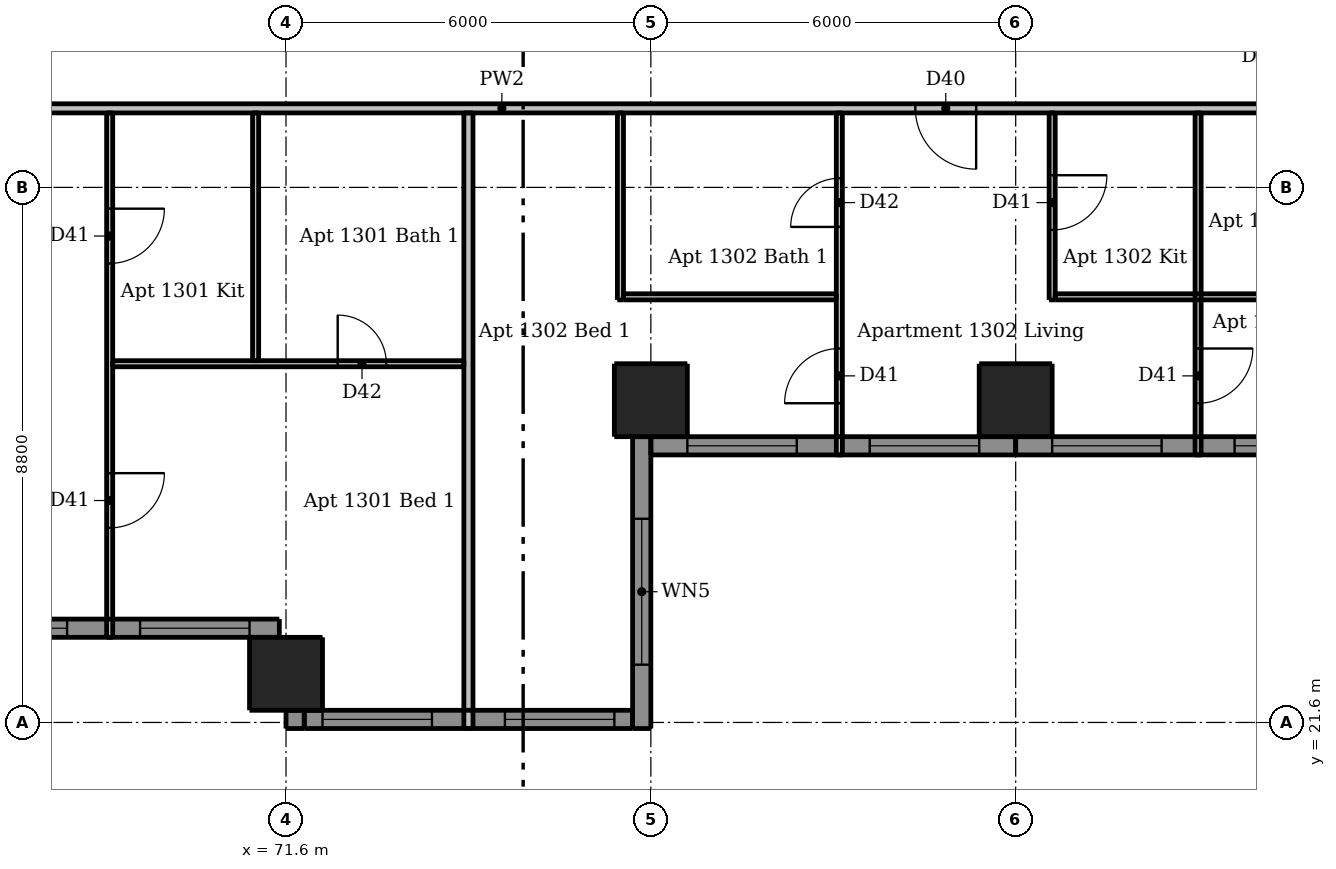
"""IFC4 building model, lengths in metres.
Left out: names, types, materials, properties, quantities, classifications, styles, units other than length and angle.
Written with IfcOpenShell. Run it as: python <this file> out.ifc"""

import sys

from ifc_helpers import new_model, si_unit, direction, frame, frame_2d, origin, origin_2d, place, context, subcontext, project, spatial, rectangle, extrude, element, fill, save


model = new_model("IFC4")
c1 = context("Model", 3, precision=1e-05, world=origin(), true_north=direction((0.0, 1.0)))
c2 = subcontext(c1, "Body", "Model", "MODEL_VIEW")
j1 = project(units=[si_unit("LENGTHUNIT", "METRE"), si_unit("PLANEANGLEUNIT", "RADIAN")], contexts=[c1])
p1 = place(None, origin())
s1 = spatial("IfcSite", under=j1, at=p1, CompositionType="ELEMENT")
p2 = place(p1, origin())
s2 = spatial("IfcBuilding", under=s1, at=p2, CompositionType="ELEMENT")
p3 = place(p2, frame((0.0, 0.0, 49.9)))
s3 = spatial("IfcBuildingStorey", under=s2, at=p3, CompositionType="ELEMENT", Elevation=49.9)
p4 = place(p3, frame((71.6, 22.4, 0.0), z_axis=(0.0, 0.0, 1.0), x_axis=(1.0, 0.0, 0.0)))
e1 = element("IfcColumn", 1, at=p4, inside=s3, PredefinedType="COLUMN", context=c2, shape_type="SweptSolid", body=[
    extrude(rectangle(XDim=1.2, YDim=1.2, at=origin_2d()), origin(), (0.0, 0.0, 1.0), 3.3),
])
for number, where, z_axis, x_axis in (
    (2, (77.6, 26.9, 0.0), (0.0, 0.0, 1.0), (1.0, 0.0, 0.0)),
    (3, (83.6, 26.9, 0.0), (0.0, 0.0, 1.0), (1.0, 0.0, 0.0)),
):
    element("IfcColumn", number, at=place(p3, frame(where, z_axis=z_axis, x_axis=x_axis)), inside=s3, PredefinedType="COLUMN", context=c2, shape_type="SweptSolid", body=[
        extrude(rectangle(XDim=1.2, YDim=1.2, at=origin_2d()), origin(), (0.0, 0.0, 1.0), 3.05),
    ])
p5 = place(p3, frame((71.75, 21.8, 0.0), z_axis=(0.0, 0.0, 1.0), x_axis=(0.0, -1.0, 0.0)))
e4 = element("IfcWall", 4, at=p5, inside=s3, PredefinedType="SOLIDWALL", context=c2, shape_type="SweptSolid", body=[
    extrude(rectangle(XDim=0.3, YDim=0.3, at=frame_2d((0.15, 0.0))), origin(), (0.0, 0.0, 1.0), 3.05),
])
p6 = place(p3, frame((77.45, 21.5, 0.0), z_axis=(0.0, 0.0, 1.0), x_axis=(0.0, 1.0, 0.0)))
e5 = element("IfcWall", 5, at=p6, inside=s3, PredefinedType="SOLIDWALL", context=c2, shape_type="SweptSolid", body=[
    extrude(rectangle(XDim=4.8, YDim=0.3, at=frame_2d((2.4, 0.0))), origin(), (0.0, 0.0, 1.0), 3.05),
])
p7 = place(p6, frame((1.05, 0.0, 0.15)))
e6 = element("IfcOpeningElement", 6, at=p7, cuts=e5, PredefinedType="OPENING", context=c2, shape_type="SweptSolid", body=[
    extrude(rectangle(XDim=2.4, YDim=2.1, at=frame_2d((1.2, 1.05))), frame((0.0, 0.16, 0.0), z_axis=(0.0, -1.0, 0.0), x_axis=(1.0, 0.0, 0.0)), (0.0, 0.0, 1.0), 0.32),
])
p8 = place(p3, frame((65.71, 23.15, 0.0), z_axis=(0.0, 0.0, 1.0), x_axis=(1.0, 0.0, 0.0)))
e7 = element("IfcWall", 7, at=p8, inside=s3, PredefinedType="SOLIDWALL", context=c2, shape_type="SweptSolid", body=[
    extrude(rectangle(XDim=5.78, YDim=0.3, at=frame_2d((2.89, 0.0))), origin(), (0.0, 0.0, 1.0), 3.05),
])
p9 = place(p8, frame((0.49, 0.0, 0.15)))
e8 = element("IfcOpeningElement", 8, at=p9, cuts=e7, PredefinedType="OPENING", context=c2, shape_type="SweptSolid", body=[
    extrude(rectangle(XDim=1.8, YDim=2.1, at=frame_2d((0.9, 1.05))), frame((0.0, 0.16, 0.0), z_axis=(0.0, -1.0, 0.0), x_axis=(1.0, 0.0, 0.0)), (0.0, 0.0, 1.0), 0.32),
])
p10 = place(p8, frame((3.49, 0.0, 0.15)))
e9 = element("IfcOpeningElement", 9, at=p10, cuts=e7, PredefinedType="OPENING", context=c2, shape_type="SweptSolid", body=[
    extrude(rectangle(XDim=1.8, YDim=2.1, at=frame_2d((0.9, 1.05))), frame((0.0, 0.16, 0.0), z_axis=(0.0, -1.0, 0.0), x_axis=(1.0, 0.0, 0.0)), (0.0, 0.0, 1.0), 0.32),
])
p11 = place(p3, frame((71.9, 21.65, 0.0), z_axis=(0.0, 0.0, 1.0), x_axis=(1.0, 0.0, 0.0)))
e10 = element("IfcWall", 10, at=p11, inside=s3, PredefinedType="SOLIDWALL", context=c2, shape_type="SweptSolid", body=[
    extrude(rectangle(XDim=5.4, YDim=0.3, at=frame_2d((2.7, 0.0))), origin(), (0.0, 0.0, 1.0), 3.05),
])
p12 = place(p11, frame((0.3, 0.0, 0.15)))
e11 = element("IfcOpeningElement", 11, at=p12, cuts=e10, PredefinedType="OPENING", context=c2, shape_type="SweptSolid", body=[
    extrude(rectangle(XDim=1.8, YDim=2.1, at=frame_2d((0.9, 1.05))), frame((0.0, 0.16, 0.0), z_axis=(0.0, -1.0, 0.0), x_axis=(1.0, 0.0, 0.0)), (0.0, 0.0, 1.0), 0.32),
])
p13 = place(p11, frame((3.3, 0.0, 0.15)))
e12 = element("IfcOpeningElement", 12, at=p13, cuts=e10, PredefinedType="OPENING", context=c2, shape_type="SweptSolid", body=[
    extrude(rectangle(XDim=1.8, YDim=2.1, at=frame_2d((0.9, 1.05))), frame((0.0, 0.16, 0.0), z_axis=(0.0, -1.0, 0.0), x_axis=(1.0, 0.0, 0.0)), (0.0, 0.0, 1.0), 0.32),
])
p14 = place(p3, frame((77.6, 26.15, 0.0), z_axis=(0.0, 0.0, 1.0), x_axis=(1.0, 0.0, 0.0)))
e13 = element("IfcWall", 13, at=p14, inside=s3, PredefinedType="SOLIDWALL", context=c2, shape_type="SweptSolid", body=[
    extrude(rectangle(XDim=6.0, YDim=0.3, at=frame_2d((3.0, 0.0))), origin(), (0.0, 0.0, 1.0), 3.05),
])
p15 = place(p14, frame((0.6, 0.0, 0.15)))
e14 = element("IfcOpeningElement", 14, at=p15, cuts=e13, PredefinedType="OPENING", context=c2, shape_type="SweptSolid", body=[
    extrude(rectangle(XDim=1.8, YDim=2.1, at=frame_2d((0.9, 1.05))), frame((0.0, 0.16, 0.0), z_axis=(0.0, -1.0, 0.0), x_axis=(1.0, 0.0, 0.0)), (0.0, 0.0, 1.0), 0.32),
])
p16 = place(p14, frame((3.6, 0.0, 0.15)))
e15 = element("IfcOpeningElement", 15, at=p16, cuts=e13, PredefinedType="OPENING", context=c2, shape_type="SweptSolid", body=[
    extrude(rectangle(XDim=1.8, YDim=2.1, at=frame_2d((0.9, 1.05))), frame((0.0, 0.16, 0.0), z_axis=(0.0, -1.0, 0.0), x_axis=(1.0, 0.0, 0.0)), (0.0, 0.0, 1.0), 0.32),
])
p17 = place(p3, frame((83.6, 26.15, 0.0), z_axis=(0.0, 0.0, 1.0), x_axis=(1.0, 0.0, 0.0)))
e16 = element("IfcWall", 16, at=p17, inside=s3, PredefinedType="SOLIDWALL", context=c2, shape_type="SweptSolid", body=[
    extrude(rectangle(XDim=5.89, YDim=0.3, at=frame_2d((2.945, 0.0))), origin(), (0.0, 0.0, 1.0), 3.05),
])
p18 = place(p17, frame((0.6, 0.0, 0.15)))
e17 = element("IfcOpeningElement", 17, at=p18, cuts=e16, PredefinedType="OPENING", context=c2, shape_type="SweptSolid", body=[
    extrude(rectangle(XDim=1.8, YDim=2.1, at=frame_2d((0.9, 1.05))), frame((0.0, 0.16, 0.0), z_axis=(0.0, -1.0, 0.0), x_axis=(1.0, 0.0, 0.0)), (0.0, 0.0, 1.0), 0.32),
])
p19 = place(p17, frame((3.6, 0.0, 0.15)))
e18 = element("IfcOpeningElement", 18, at=p19, cuts=e16, PredefinedType="OPENING", context=c2, shape_type="SweptSolid", body=[
    extrude(rectangle(XDim=1.8, YDim=2.1, at=frame_2d((0.9, 1.05))), frame((0.0, 0.16, 0.0), z_axis=(0.0, -1.0, 0.0), x_axis=(1.0, 0.0, 0.0)), (0.0, 0.0, 1.0), 0.32),
])
p20 = place(p3, frame((68.7, 31.625, 0.0), z_axis=(0.0, 0.0, 1.0), x_axis=(0.0, -1.0, 0.0)))
e19 = element("IfcWall", 19, at=p20, inside=s3, PredefinedType="PARTITIONING", context=c2, shape_type="SweptSolid", body=[
    extrude(rectangle(XDim=8.625, YDim=0.1, at=frame_2d((4.312, 0.0))), origin(), (0.0, 0.0, 1.0), 3.05),
])
p21 = place(p20, frame((1.575, 0.0, 0.0)))
e20 = element("IfcOpeningElement", 20, at=p21, cuts=e19, PredefinedType="OPENING", context=c2, shape_type="SweptSolid", body=[
    extrude(rectangle(XDim=0.9, YDim=2.1, at=frame_2d((0.45, 1.05))), frame((0.0, 0.06, 0.0), z_axis=(0.0, -1.0, 0.0), x_axis=(1.0, 0.0, 0.0)), (0.0, 0.0, 1.0), 0.12),
])
p22 = place(p20, frame((5.925, 0.0, 0.0)))
e21 = element("IfcOpeningElement", 21, at=p22, cuts=e19, PredefinedType="OPENING", context=c2, shape_type="SweptSolid", body=[
    extrude(rectangle(XDim=0.9, YDim=2.1, at=frame_2d((0.45, 1.05))), frame((0.0, 0.06, 0.0), z_axis=(0.0, -1.0, 0.0), x_axis=(1.0, 0.0, 0.0)), (0.0, 0.0, 1.0), 0.12),
])
p23 = place(p3, frame((71.1, 27.55, 0.0), z_axis=(0.0, 0.0, 1.0), x_axis=(0.0, 1.0, 0.0)))
e22 = element("IfcWall", 22, at=p23, inside=s3, PredefinedType="PARTITIONING", context=c2, shape_type="SweptSolid", body=[
    extrude(rectangle(XDim=4.075, YDim=0.1, at=frame_2d((2.038, 0.0))), origin(), (0.0, 0.0, 1.0), 3.05),
])
p24 = place(p3, frame((77.1, 28.55, 0.0), z_axis=(0.0, 0.0, 1.0), x_axis=(0.0, 1.0, 0.0)))
e23 = element("IfcWall", 23, at=p24, inside=s3, PredefinedType="PARTITIONING", context=c2, shape_type="SweptSolid", body=[
    extrude(rectangle(XDim=3.075, YDim=0.1, at=frame_2d((1.538, 0.0))), origin(), (0.0, 0.0, 1.0), 3.05),
])
p25 = place(p3, frame((80.7, 26.0, 0.0), z_axis=(0.0, 0.0, 1.0), x_axis=(0.0, 1.0, 0.0)))
e24 = element("IfcWall", 24, at=p25, inside=s3, PredefinedType="PARTITIONING", context=c2, shape_type="SweptSolid", body=[
    extrude(rectangle(XDim=5.625, YDim=0.1, at=frame_2d((2.812, 0.0))), origin(), (0.0, 0.0, 1.0), 3.05),
])
p26 = place(p25, frame((0.85, 0.0, 0.0)))
e25 = element("IfcOpeningElement", 25, at=p26, cuts=e24, PredefinedType="OPENING", context=c2, shape_type="SweptSolid", body=[
    extrude(rectangle(XDim=0.9, YDim=2.1, at=frame_2d((0.45, 1.05))), frame((0.0, 0.06, 0.0), z_axis=(0.0, -1.0, 0.0), x_axis=(1.0, 0.0, 0.0)), (0.0, 0.0, 1.0), 0.12),
])
p27 = place(p25, frame((3.75, 0.0, 0.0)))
e26 = element("IfcOpeningElement", 26, at=p27, cuts=e24, PredefinedType="OPENING", context=c2, shape_type="SweptSolid", body=[
    extrude(rectangle(XDim=0.8, YDim=2.1, at=frame_2d((0.4, 1.05))), frame((0.0, 0.06, 0.0), z_axis=(0.0, -1.0, 0.0), x_axis=(1.0, 0.0, 0.0)), (0.0, 0.0, 1.0), 0.12),
])
p28 = place(p3, frame((84.2, 31.625, 0.0), z_axis=(0.0, 0.0, 1.0), x_axis=(0.0, -1.0, 0.0)))
e27 = element("IfcWall", 27, at=p28, inside=s3, PredefinedType="PARTITIONING", context=c2, shape_type="SweptSolid", body=[
    extrude(rectangle(XDim=3.075, YDim=0.1, at=frame_2d((1.538, 0.0))), origin(), (0.0, 0.0, 1.0), 3.05),
])
p29 = place(p28, frame((1.025, 0.0, 0.0)))
e28 = element("IfcOpeningElement", 28, at=p29, cuts=e27, PredefinedType="OPENING", context=c2, shape_type="SweptSolid", body=[
    extrude(rectangle(XDim=0.9, YDim=2.1, at=frame_2d((0.45, 1.05))), frame((0.0, 0.06, 0.0), z_axis=(0.0, -1.0, 0.0), x_axis=(1.0, 0.0, 0.0)), (0.0, 0.0, 1.0), 0.12),
])
p30 = place(p3, frame((86.6, 31.625, 0.0), z_axis=(0.0, 0.0, 1.0), x_axis=(0.0, -1.0, 0.0)))
e29 = element("IfcWall", 29, at=p30, inside=s3, PredefinedType="PARTITIONING", context=c2, shape_type="SweptSolid", body=[
    extrude(rectangle(XDim=5.625, YDim=0.1, at=frame_2d((2.812, 0.0))), origin(), (0.0, 0.0, 1.0), 3.05),
])
p31 = place(p30, frame((3.875, 0.0, 0.0)))
e30 = element("IfcOpeningElement", 30, at=p31, cuts=e29, PredefinedType="OPENING", context=c2, shape_type="SweptSolid", body=[
    extrude(rectangle(XDim=0.9, YDim=2.1, at=frame_2d((0.45, 1.05))), frame((0.0, 0.06, 0.0), z_axis=(0.0, -1.0, 0.0), x_axis=(1.0, 0.0, 0.0)), (0.0, 0.0, 1.0), 0.12),
])
p32 = place(p3, frame((77.15, 28.6, 0.0), z_axis=(0.0, 0.0, 1.0), x_axis=(1.0, 0.0, 0.0)))
e31 = element("IfcWall", 31, at=p32, inside=s3, PredefinedType="PARTITIONING", context=c2, shape_type="SweptSolid", body=[
    extrude(rectangle(XDim=3.5, YDim=0.1, at=frame_2d((1.75, 0.0))), origin(), (0.0, 0.0, 1.0), 3.05),
])
p33 = place(p3, frame((84.25, 28.6, 0.0), z_axis=(0.0, 0.0, 1.0), x_axis=(1.0, 0.0, 0.0)))
e32 = element("IfcWall", 32, at=p33, inside=s3, PredefinedType="PARTITIONING", context=c2, shape_type="SweptSolid", body=[
    extrude(rectangle(XDim=5.275, YDim=0.1, at=frame_2d((2.637, 0.0))), origin(), (0.0, 0.0, 1.0), 3.05),
])
p34 = place(p33, frame((3.45, 0.0, 0.0)))
e33 = element("IfcOpeningElement", 33, at=p34, cuts=e32, PredefinedType="OPENING", context=c2, shape_type="SweptSolid", body=[
    extrude(rectangle(XDim=0.8, YDim=2.1, at=frame_2d((0.4, 1.05))), frame((0.0, 0.06, 0.0), z_axis=(0.0, -1.0, 0.0), x_axis=(1.0, 0.0, 0.0)), (0.0, 0.0, 1.0), 0.12),
])
p35 = place(p3, frame((68.75, 27.5, 0.0), z_axis=(0.0, 0.0, 1.0), x_axis=(1.0, 0.0, 0.0)))
e34 = element("IfcWall", 34, at=p35, inside=s3, PredefinedType="PARTITIONING", context=c2, shape_type="SweptSolid", body=[
    extrude(rectangle(XDim=5.775, YDim=0.1, at=frame_2d((2.887, 0.0))), origin(), (0.0, 0.0, 1.0), 3.05),
])
p36 = place(p35, frame((3.7, 0.0, 0.0)))
e35 = element("IfcOpeningElement", 35, at=p36, cuts=e34, PredefinedType="OPENING", context=c2, shape_type="SweptSolid", body=[
    extrude(rectangle(XDim=0.8, YDim=2.1, at=frame_2d((0.4, 1.05))), frame((0.0, 0.06, 0.0), z_axis=(0.0, -1.0, 0.0), x_axis=(1.0, 0.0, 0.0)), (0.0, 0.0, 1.0), 0.12),
])
p37 = place(p3, frame((74.6, 21.5, 0.0), z_axis=(0.0, 0.0, 1.0), x_axis=(0.0, 1.0, 0.0)))
e36 = element("IfcWall", 36, at=p37, inside=s3, PredefinedType="PARTITIONING", context=c2, shape_type="SweptSolid", body=[
    extrude(rectangle(XDim=10.125, YDim=0.15, at=frame_2d((5.062, 0.0))), origin(), (0.0, 0.0, 1.0), 3.05),
])
p38 = place(p3, frame((89.525, 31.7, 0.0), z_axis=(0.0, 0.0, 1.0), x_axis=(-1.0, 0.0, 0.0)))
e37 = element("IfcWall", 37, at=p38, inside=s3, PredefinedType="PARTITIONING", context=c2, shape_type="SweptSolid", body=[
    extrude(rectangle(XDim=28.75, YDim=0.15, at=frame_2d((14.375, 0.0))), origin(), (0.0, 0.0, 1.0), 3.05),
])
p39 = place(p38, frame((24.325, 0.0, 0.0)))
e38 = element("IfcOpeningElement", 38, at=p39, cuts=e37, PredefinedType="OPENING", context=c2, shape_type="SweptSolid", body=[
    extrude(rectangle(XDim=1.0, YDim=2.1, at=frame_2d((0.5, 1.05))), frame((0.0, 0.085, 0.0), z_axis=(0.0, -1.0, 0.0), x_axis=(1.0, 0.0, 0.0)), (0.0, 0.0, 1.0), 0.17),
])
p40 = place(p38, frame((6.575, 0.0, 0.0)))
e39 = element("IfcOpeningElement", 39, at=p40, cuts=e37, PredefinedType="OPENING", context=c2, shape_type="SweptSolid", body=[
    extrude(rectangle(XDim=1.0, YDim=2.1, at=frame_2d((0.5, 1.05))), frame((0.0, 0.085, 0.0), z_axis=(0.0, -1.0, 0.0), x_axis=(1.0, 0.0, 0.0)), (0.0, 0.0, 1.0), 0.17),
])
p41 = place(p7, origin())
e40 = element("IfcWindow", 40, at=p41, inside=s3, PartitioningType="DOUBLE_PANEL_VERTICAL", PredefinedType="WINDOW", context=c2, shape_type="SweptSolid", body=[
    extrude(rectangle(XDim=2.4, YDim=2.1, at=frame_2d((1.2, 1.05))), frame((0.0, 0.03, 0.0), z_axis=(0.0, -1.0, 0.0), x_axis=(1.0, 0.0, 0.0)), (0.0, 0.0, 1.0), 0.06),
])
fill(e6, e40)
p42 = place(p9, origin())
e41 = element("IfcWindow", 41, at=p42, inside=s3, PartitioningType="DOUBLE_PANEL_VERTICAL", PredefinedType="WINDOW", context=c2, shape_type="SweptSolid", body=[
    extrude(rectangle(XDim=1.8, YDim=2.1, at=frame_2d((0.9, 1.05))), frame((0.0, 0.03, 0.0), z_axis=(0.0, -1.0, 0.0), x_axis=(1.0, 0.0, 0.0)), (0.0, 0.0, 1.0), 0.06),
])
fill(e8, e41)
p43 = place(p10, origin())
e42 = element("IfcWindow", 42, at=p43, inside=s3, PartitioningType="DOUBLE_PANEL_VERTICAL", PredefinedType="WINDOW", context=c2, shape_type="SweptSolid", body=[
    extrude(rectangle(XDim=1.8, YDim=2.1, at=frame_2d((0.9, 1.05))), frame((0.0, 0.03, 0.0), z_axis=(0.0, -1.0, 0.0), x_axis=(1.0, 0.0, 0.0)), (0.0, 0.0, 1.0), 0.06),
])
fill(e9, e42)
p44 = place(p12, origin())
e43 = element("IfcWindow", 43, at=p44, inside=s3, PartitioningType="DOUBLE_PANEL_VERTICAL", PredefinedType="WINDOW", context=c2, shape_type="SweptSolid", body=[
    extrude(rectangle(XDim=1.8, YDim=2.1, at=frame_2d((0.9, 1.05))), frame((0.0, 0.03, 0.0), z_axis=(0.0, -1.0, 0.0), x_axis=(1.0, 0.0, 0.0)), (0.0, 0.0, 1.0), 0.06),
])
fill(e11, e43)
p45 = place(p13, origin())
e44 = element("IfcWindow", 44, at=p45, inside=s3, PartitioningType="DOUBLE_PANEL_VERTICAL", PredefinedType="WINDOW", context=c2, shape_type="SweptSolid", body=[
    extrude(rectangle(XDim=1.8, YDim=2.1, at=frame_2d((0.9, 1.05))), frame((0.0, 0.03, 0.0), z_axis=(0.0, -1.0, 0.0), x_axis=(1.0, 0.0, 0.0)), (0.0, 0.0, 1.0), 0.06),
])
fill(e12, e44)
p46 = place(p15, origin())
e45 = element("IfcWindow", 45, at=p46, inside=s3, PartitioningType="DOUBLE_PANEL_VERTICAL", PredefinedType="WINDOW", context=c2, shape_type="SweptSolid", body=[
    extrude(rectangle(XDim=1.8, YDim=2.1, at=frame_2d((0.9, 1.05))), frame((0.0, 0.03, 0.0), z_axis=(0.0, -1.0, 0.0), x_axis=(1.0, 0.0, 0.0)), (0.0, 0.0, 1.0), 0.06),
])
fill(e14, e45)
p47 = place(p16, origin())
e46 = element("IfcWindow", 46, at=p47, inside=s3, PartitioningType="DOUBLE_PANEL_VERTICAL", PredefinedType="WINDOW", context=c2, shape_type="SweptSolid", body=[
    extrude(rectangle(XDim=1.8, YDim=2.1, at=frame_2d((0.9, 1.05))), frame((0.0, 0.03, 0.0), z_axis=(0.0, -1.0, 0.0), x_axis=(1.0, 0.0, 0.0)), (0.0, 0.0, 1.0), 0.06),
])
fill(e15, e46)
p48 = place(p18, origin())
e47 = element("IfcWindow", 47, at=p48, inside=s3, PartitioningType="DOUBLE_PANEL_VERTICAL", PredefinedType="WINDOW", context=c2, shape_type="SweptSolid", body=[
    extrude(rectangle(XDim=1.8, YDim=2.1, at=frame_2d((0.9, 1.05))), frame((0.0, 0.03, 0.0), z_axis=(0.0, -1.0, 0.0), x_axis=(1.0, 0.0, 0.0)), (0.0, 0.0, 1.0), 0.06),
])
fill(e17, e47)
p49 = place(p19, origin())
e48 = element("IfcWindow", 48, at=p49, inside=s3, PartitioningType="DOUBLE_PANEL_VERTICAL", PredefinedType="WINDOW", context=c2, shape_type="SweptSolid", body=[
    extrude(rectangle(XDim=1.8, YDim=2.1, at=frame_2d((0.9, 1.05))), frame((0.0, 0.03, 0.0), z_axis=(0.0, -1.0, 0.0), x_axis=(1.0, 0.0, 0.0)), (0.0, 0.0, 1.0), 0.06),
])
fill(e18, e48)
p50 = place(p21, origin())
e49 = element("IfcDoor", 49, at=p50, inside=s3, OperationType="SINGLE_SWING_LEFT", PredefinedType="DOOR", context=c2, shape_type="SweptSolid", body=[
    extrude(rectangle(XDim=0.9, YDim=2.1, at=frame_2d((0.45, 1.05))), frame((0.0, 0.025, 0.0), z_axis=(0.0, -1.0, 0.0), x_axis=(1.0, 0.0, 0.0)), (0.0, 0.0, 1.0), 0.05),
])
fill(e20, e49)
p51 = place(p22, origin())
e50 = element("IfcDoor", 50, at=p51, inside=s3, OperationType="SINGLE_SWING_LEFT", PredefinedType="DOOR", context=c2, shape_type="SweptSolid", body=[
    extrude(rectangle(XDim=0.9, YDim=2.1, at=frame_2d((0.45, 1.05))), frame((0.0, 0.025, 0.0), z_axis=(0.0, -1.0, 0.0), x_axis=(1.0, 0.0, 0.0)), (0.0, 0.0, 1.0), 0.05),
])
fill(e21, e50)
p52 = place(p36, origin())
e51 = element("IfcDoor", 51, at=p52, inside=s3, OperationType="SINGLE_SWING_LEFT", PredefinedType="DOOR", context=c2, shape_type="SweptSolid", body=[
    extrude(rectangle(XDim=0.8, YDim=2.1, at=frame_2d((0.4, 1.05))), frame((0.0, 0.025, 0.0), z_axis=(0.0, -1.0, 0.0), x_axis=(1.0, 0.0, 0.0)), (0.0, 0.0, 1.0), 0.05),
])
fill(e35, e51)
p53 = place(p40, origin())
e52 = element("IfcDoor", 52, at=p53, inside=s3, OperationType="SINGLE_SWING_LEFT", PredefinedType="DOOR", context=c2, shape_type="SweptSolid", body=[
    extrude(rectangle(XDim=1.0, YDim=2.1, at=frame_2d((0.5, 1.05))), frame((0.0, 0.025, 0.0), z_axis=(0.0, -1.0, 0.0), x_axis=(1.0, 0.0, 0.0)), (0.0, 0.0, 1.0), 0.05),
])
fill(e39, e52)
p54 = place(p29, origin())
e53 = element("IfcDoor", 53, at=p54, inside=s3, OperationType="SINGLE_SWING_LEFT", PredefinedType="DOOR", context=c2, shape_type="SweptSolid", body=[
    extrude(rectangle(XDim=0.9, YDim=2.1, at=frame_2d((0.45, 1.05))), frame((0.0, 0.025, 0.0), z_axis=(0.0, -1.0, 0.0), x_axis=(1.0, 0.0, 0.0)), (0.0, 0.0, 1.0), 0.05),
])
fill(e28, e53)
p55 = place(p26, origin())
e54 = element("IfcDoor", 54, at=p55, inside=s3, OperationType="SINGLE_SWING_LEFT", PredefinedType="DOOR", context=c2, shape_type="SweptSolid", body=[
    extrude(rectangle(XDim=0.9, YDim=2.1, at=frame_2d((0.45, 1.05))), frame((0.0, 0.025, 0.0), z_axis=(0.0, -1.0, 0.0), x_axis=(1.0, 0.0, 0.0)), (0.0, 0.0, 1.0), 0.05),
])
fill(e25, e54)
p56 = place(p27, origin())
e55 = element("IfcDoor", 55, at=p56, inside=s3, OperationType="SINGLE_SWING_LEFT", PredefinedType="DOOR", context=c2, shape_type="SweptSolid", body=[
    extrude(rectangle(XDim=0.8, YDim=2.1, at=frame_2d((0.4, 1.05))), frame((0.0, 0.025, 0.0), z_axis=(0.0, -1.0, 0.0), x_axis=(1.0, 0.0, 0.0)), (0.0, 0.0, 1.0), 0.05),
])
fill(e26, e55)
p57 = place(p31, origin())
e56 = element("IfcDoor", 56, at=p57, inside=s3, OperationType="SINGLE_SWING_LEFT", PredefinedType="DOOR", context=c2, shape_type="SweptSolid", body=[
    extrude(rectangle(XDim=0.9, YDim=2.1, at=frame_2d((0.45, 1.05))), frame((0.0, 0.025, 0.0), z_axis=(0.0, -1.0, 0.0), x_axis=(1.0, 0.0, 0.0)), (0.0, 0.0, 1.0), 0.05),
])
fill(e30, e56)
save(model, sys.argv[1])
